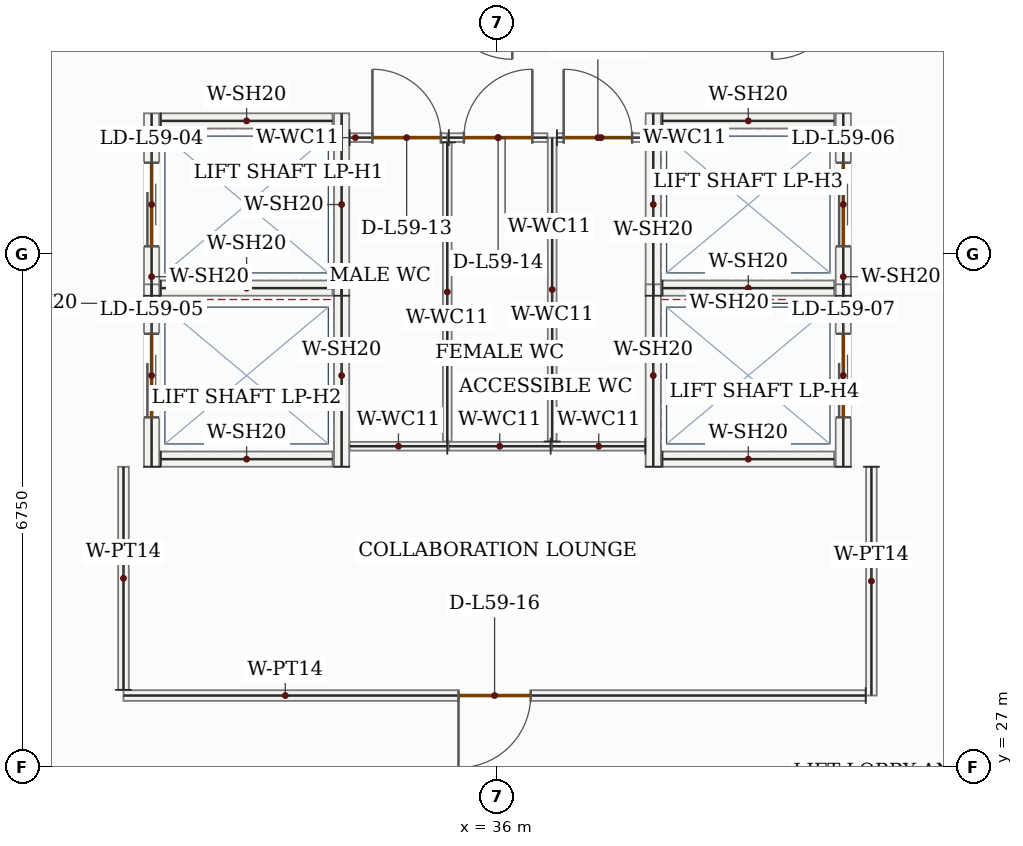
"""IFC4 building model, lengths in metres.
Left out: names, types, materials, properties, quantities, classifications, styles, units other than length and angle.
Written with IfcOpenShell. Run it as: python <this file> out.ifc"""

import sys

from ifc_helpers import new_model, si_unit, direction, frame, frame_2d, origin, place, context, subcontext, project, spatial, rectangle, extrude, source, transform, mapped, element, fill, save


model = new_model("IFC4")
c1 = context("Model", 3, precision=1e-05, world=origin(), true_north=direction((0.0, 1.0)))
c2 = subcontext(c1, "Body", "Model", "MODEL_VIEW")
j1 = project(units=[si_unit("LENGTHUNIT", "METRE"), si_unit("PLANEANGLEUNIT", "RADIAN")], contexts=[c1])
p1 = place(None, origin())
s1 = spatial("IfcSite", under=j1, at=p1, CompositionType="ELEMENT")
p2 = place(p1, origin())
s2 = spatial("IfcBuilding", under=s1, at=p2, CompositionType="ELEMENT")
p3 = place(p2, frame((0.0, 0.0, 250.35)))
s3 = spatial("IfcBuildingStorey", under=s2, at=p3, CompositionType="ELEMENT", Elevation=250.35)
p4 = place(p3, frame((31.45, 33.2, 0.0), z_axis=(0.0, 0.0, 1.0), x_axis=(0.0, 1.0, 0.0)))
e1 = element("IfcWall", 1, at=p4, inside=s3, PredefinedType="SOLIDWALL", context=c2, shape_type="SweptSolid", body=[
    extrude(rectangle(XDim=2.4, YDim=0.2, at=frame_2d((1.2, 0.0))), origin(), (0.0, 0.0, 1.0), 3.5),
])
p5 = place(p4, frame((0.65, 0.0, 0.0)))
e2 = element("IfcOpeningElement", 2, at=p5, cuts=e1, PredefinedType="OPENING", context=c2, shape_type="SweptSolid", body=[
    extrude(rectangle(XDim=1.1, YDim=2.15, at=frame_2d((0.55, 1.075))), frame((0.0, 0.11, 0.0), z_axis=(0.0, -1.0, 0.0), x_axis=(1.0, 0.0, 0.0)), (0.0, 0.0, 1.0), 0.22),
])
m1 = source(origin(), c2, "Body", "SweptSolid", [
    extrude(rectangle(XDim=2.4, YDim=0.2, at=frame_2d((1.2, 0.0))), origin(), (0.0, 0.0, 1.0), 3.5),
])
p6 = place(p3, frame((33.95, 33.2, 0.0), z_axis=(0.0, 0.0, 1.0), x_axis=(0.0, 1.0, 0.0)))
e3 = element("IfcWall", 3, at=p6, inside=s3, PredefinedType="SOLIDWALL", context=c2, shape_type="MappedRepresentation", body=[
    mapped(m1, transform((0.0, 0.0, 0.0), x_axis=(1.0, 0.0, 0.0), y_axis=(0.0, 1.0, 0.0), z_axis=(0.0, 0.0, 1.0), scale=1.0)),
])
m2 = source(origin(), c2, "Body", "SweptSolid", [
    extrude(rectangle(XDim=2.26, YDim=0.2, at=frame_2d((1.13, 0.0))), origin(), (0.0, 0.0, 1.0), 3.5),
])
for number, where, z_axis, x_axis in (
    (4, (31.57, 33.3, 0.0), (0.0, 0.0, 1.0), (1.0, 0.0, 0.0)),
    (5, (31.57, 35.5, 0.0), (0.0, 0.0, 1.0), (1.0, 0.0, 0.0)),
):
    element("IfcWall", number, at=place(p3, frame(where, z_axis=z_axis, x_axis=x_axis)), inside=s3, PredefinedType="SOLIDWALL", context=c2, shape_type="MappedRepresentation", body=[
        mapped(m2, transform((0.0, 0.0, 0.0), x_axis=(1.0, 0.0, 0.0), y_axis=(0.0, 1.0, 0.0), z_axis=(0.0, 0.0, 1.0), scale=1.0)),
    ])
p7 = place(p3, frame((31.45, 30.95, 0.0), z_axis=(0.0, 0.0, 1.0), x_axis=(0.0, 1.0, 0.0)))
e6 = element("IfcWall", 6, at=p7, inside=s3, PredefinedType="SOLIDWALL", context=c2, shape_type="SweptSolid", body=[
    extrude(rectangle(XDim=2.4, YDim=0.2, at=frame_2d((1.2, 0.0))), origin(), (0.0, 0.0, 1.0), 3.5),
])
p8 = place(p7, frame((0.65, 0.0, 0.0)))
e7 = element("IfcOpeningElement", 7, at=p8, cuts=e6, PredefinedType="OPENING", context=c2, shape_type="SweptSolid", body=[
    extrude(rectangle(XDim=1.1, YDim=2.15, at=frame_2d((0.55, 1.075))), frame((0.0, 0.11, 0.0), z_axis=(0.0, -1.0, 0.0), x_axis=(1.0, 0.0, 0.0)), (0.0, 0.0, 1.0), 0.22),
])
p9 = place(p3, frame((33.95, 30.95, 0.0), z_axis=(0.0, 0.0, 1.0), x_axis=(0.0, 1.0, 0.0)))
e8 = element("IfcWall", 8, at=p9, inside=s3, PredefinedType="SOLIDWALL", context=c2, shape_type="MappedRepresentation", body=[
    mapped(m1, transform((0.0, 0.0, 0.0), x_axis=(1.0, 0.0, 0.0), y_axis=(0.0, 1.0, 0.0), z_axis=(0.0, 0.0, 1.0), scale=1.0)),
])
p10 = place(p3, frame((31.57, 31.05, 0.0), z_axis=(0.0, 0.0, 1.0), x_axis=(1.0, 0.0, 0.0)))
e9 = element("IfcWall", 9, at=p10, inside=s3, PredefinedType="SOLIDWALL", context=c2, shape_type="MappedRepresentation", body=[
    mapped(m2, transform((0.0, 0.0, 0.0), x_axis=(1.0, 0.0, 0.0), y_axis=(0.0, 1.0, 0.0), z_axis=(0.0, 0.0, 1.0), scale=1.0)),
])
p11 = place(p3, frame((38.05, 33.2, 0.0), z_axis=(0.0, 0.0, 1.0), x_axis=(0.0, 1.0, 0.0)))
e10 = element("IfcWall", 10, at=p11, inside=s3, PredefinedType="SOLIDWALL", context=c2, shape_type="MappedRepresentation", body=[
    mapped(m1, transform((0.0, 0.0, 0.0), x_axis=(1.0, 0.0, 0.0), y_axis=(0.0, 1.0, 0.0), z_axis=(0.0, 0.0, 1.0), scale=1.0)),
])
p12 = place(p3, frame((40.55, 33.2, 0.0), z_axis=(0.0, 0.0, 1.0), x_axis=(0.0, 1.0, 0.0)))
e11 = element("IfcWall", 11, at=p12, inside=s3, PredefinedType="SOLIDWALL", context=c2, shape_type="SweptSolid", body=[
    extrude(rectangle(XDim=2.4, YDim=0.2, at=frame_2d((1.2, 0.0))), origin(), (0.0, 0.0, 1.0), 3.5),
])
p13 = place(p12, frame((0.65, 0.0, 0.0)))
e12 = element("IfcOpeningElement", 12, at=p13, cuts=e11, PredefinedType="OPENING", context=c2, shape_type="SweptSolid", body=[
    extrude(rectangle(XDim=1.1, YDim=2.15, at=frame_2d((0.55, 1.075))), frame((0.0, 0.11, 0.0), z_axis=(0.0, -1.0, 0.0), x_axis=(1.0, 0.0, 0.0)), (0.0, 0.0, 1.0), 0.22),
])
for number, where, z_axis, x_axis in (
    (13, (38.17, 33.3, 0.0), (0.0, 0.0, 1.0), (1.0, 0.0, 0.0)),
    (14, (38.17, 35.5, 0.0), (0.0, 0.0, 1.0), (1.0, 0.0, 0.0)),
):
    element("IfcWall", number, at=place(p3, frame(where, z_axis=z_axis, x_axis=x_axis)), inside=s3, PredefinedType="SOLIDWALL", context=c2, shape_type="MappedRepresentation", body=[
        mapped(m2, transform((0.0, 0.0, 0.0), x_axis=(1.0, 0.0, 0.0), y_axis=(0.0, 1.0, 0.0), z_axis=(0.0, 0.0, 1.0), scale=1.0)),
    ])
p14 = place(p3, frame((38.05, 30.95, 0.0), z_axis=(0.0, 0.0, 1.0), x_axis=(0.0, 1.0, 0.0)))
e15 = element("IfcWall", 15, at=p14, inside=s3, PredefinedType="SOLIDWALL", context=c2, shape_type="MappedRepresentation", body=[
    mapped(m1, transform((0.0, 0.0, 0.0), x_axis=(1.0, 0.0, 0.0), y_axis=(0.0, 1.0, 0.0), z_axis=(0.0, 0.0, 1.0), scale=1.0)),
])
p15 = place(p3, frame((40.55, 30.95, 0.0), z_axis=(0.0, 0.0, 1.0), x_axis=(0.0, 1.0, 0.0)))
e16 = element("IfcWall", 16, at=p15, inside=s3, PredefinedType="SOLIDWALL", context=c2, shape_type="SweptSolid", body=[
    extrude(rectangle(XDim=2.4, YDim=0.2, at=frame_2d((1.2, 0.0))), origin(), (0.0, 0.0, 1.0), 3.5),
])
p16 = place(p15, frame((0.65, 0.0, 0.0)))
e17 = element("IfcOpeningElement", 17, at=p16, cuts=e16, PredefinedType="OPENING", context=c2, shape_type="SweptSolid", body=[
    extrude(rectangle(XDim=1.1, YDim=2.15, at=frame_2d((0.55, 1.075))), frame((0.0, 0.11, 0.0), z_axis=(0.0, -1.0, 0.0), x_axis=(1.0, 0.0, 0.0)), (0.0, 0.0, 1.0), 0.22),
])
p17 = place(p3, frame((38.17, 31.05, 0.0), z_axis=(0.0, 0.0, 1.0), x_axis=(1.0, 0.0, 0.0)))
e18 = element("IfcWall", 18, at=p17, inside=s3, PredefinedType="SOLIDWALL", context=c2, shape_type="MappedRepresentation", body=[
    mapped(m2, transform((0.0, 0.0, 0.0), x_axis=(1.0, 0.0, 0.0), y_axis=(0.0, 1.0, 0.0), z_axis=(0.0, 0.0, 1.0), scale=1.0)),
])
m3 = source(origin(), c2, "Body", "SweptSolid", [
    extrude(rectangle(XDim=1.225, YDim=0.115, at=frame_2d((0.613, 0.0))), origin(), (0.0, 0.0, 1.0), 3.5),
])
p18 = place(p3, frame((37.945, 31.22, 0.0), z_axis=(0.0, 0.0, 1.0), x_axis=(-1.0, 0.0, 0.0)))
e19 = element("IfcWall", 19, at=p18, inside=s3, PredefinedType="PARTITIONING", context=c2, shape_type="MappedRepresentation", body=[
    mapped(m3, transform((0.0, 0.0, 0.0), x_axis=(1.0, 0.0, 0.0), y_axis=(0.0, 1.0, 0.0), z_axis=(0.0, 0.0, 1.0), scale=1.0)),
])
m4 = source(origin(), c2, "Body", "SweptSolid", [
    extrude(rectangle(XDim=3.998, YDim=0.115, at=frame_2d((1.999, 0.0))), origin(), (0.0, 0.0, 1.0), 3.5),
])
p19 = place(p3, frame((36.72, 31.282, 0.0), z_axis=(0.0, 0.0, 1.0), x_axis=(0.0, 1.0, 0.0)))
e20 = element("IfcWall", 20, at=p19, inside=s3, PredefinedType="PARTITIONING", context=c2, shape_type="MappedRepresentation", body=[
    mapped(m4, transform((0.0, 0.0, 0.0), x_axis=(1.0, 0.0, 0.0), y_axis=(0.0, 1.0, 0.0), z_axis=(0.0, 0.0, 1.0), scale=1.0)),
])
p20 = place(p3, frame((36.782, 35.28, 0.0), z_axis=(0.0, 0.0, 1.0), x_axis=(1.0, 0.0, 0.0)))
e21 = element("IfcWall", 21, at=p20, inside=s3, PredefinedType="PARTITIONING", context=c2, shape_type="SweptSolid", body=[
    extrude(rectangle(XDim=1.163, YDim=0.115, at=frame_2d((0.581, 0.0))), origin(), (0.0, 0.0, 1.0), 3.5),
])
p21 = place(p20, frame((0.089, 0.0, 0.0)))
e22 = element("IfcOpeningElement", 22, at=p21, cuts=e21, PredefinedType="OPENING", context=c2, shape_type="SweptSolid", body=[
    extrude(rectangle(XDim=0.9, YDim=2.1, at=frame_2d((0.45, 1.05))), frame((0.0, 0.067, 0.0), z_axis=(0.0, -1.0, 0.0), x_axis=(1.0, 0.0, 0.0)), (0.0, 0.0, 1.0), 0.135),
])
m5 = source(origin(), c2, "Body", "SweptSolid", [
    extrude(rectangle(XDim=1.285, YDim=0.115, at=frame_2d((0.643, 0.0))), origin(), (0.0, 0.0, 1.0), 3.5),
])
p22 = place(p3, frame((35.34, 31.22, 0.0), z_axis=(0.0, 0.0, 1.0), x_axis=(-1.0, 0.0, 0.0)))
e23 = element("IfcWall", 23, at=p22, inside=s3, PredefinedType="PARTITIONING", context=c2, shape_type="MappedRepresentation", body=[
    mapped(m5, transform((0.0, 0.0, 0.0), x_axis=(1.0, 0.0, 0.0), y_axis=(0.0, 1.0, 0.0), z_axis=(0.0, 0.0, 1.0), scale=1.0)),
])
p23 = place(p3, frame((34.055, 35.28, 0.0), z_axis=(0.0, 0.0, 1.0), x_axis=(1.0, 0.0, 0.0)))
e24 = element("IfcWall", 24, at=p23, inside=s3, PredefinedType="PARTITIONING", context=c2, shape_type="SweptSolid", body=[
    extrude(rectangle(XDim=1.285, YDim=0.115, at=frame_2d((0.643, 0.0))), origin(), (0.0, 0.0, 1.0), 3.5),
])
p24 = place(p23, frame((0.3, 0.0, 0.0)))
e25 = element("IfcOpeningElement", 25, at=p24, cuts=e24, PredefinedType="OPENING", context=c2, shape_type="SweptSolid", body=[
    extrude(rectangle(XDim=0.9, YDim=2.1, at=frame_2d((0.45, 1.05))), frame((0.0, 0.067, 0.0), z_axis=(0.0, -1.0, 0.0), x_axis=(1.0, 0.0, 0.0)), (0.0, 0.0, 1.0), 0.135),
])
m6 = source(origin(), c2, "Body", "SweptSolid", [
    extrude(rectangle(XDim=3.935, YDim=0.115, at=frame_2d((1.968, 0.0))), origin(), (0.0, 0.0, 1.0), 3.5),
])
p25 = place(p3, frame((35.34, 35.218, 0.0), z_axis=(0.0, 0.0, 1.0), x_axis=(0.0, -1.0, 0.0)))
e26 = element("IfcWall", 26, at=p25, inside=s3, PredefinedType="PARTITIONING", context=c2, shape_type="MappedRepresentation", body=[
    mapped(m6, transform((0.0, 0.0, 0.0), x_axis=(1.0, 0.0, 0.0), y_axis=(0.0, 1.0, 0.0), z_axis=(0.0, 0.0, 1.0), scale=1.0)),
])
m7 = source(origin(), c2, "Body", "SweptSolid", [
    extrude(rectangle(XDim=1.34, YDim=0.115, at=frame_2d((0.67, 0.0))), origin(), (0.0, 0.0, 1.0), 3.5),
])
p26 = place(p3, frame((36.7, 31.22, 0.0), z_axis=(0.0, 0.0, 1.0), x_axis=(-1.0, 0.0, 0.0)))
e27 = element("IfcWall", 27, at=p26, inside=s3, PredefinedType="PARTITIONING", context=c2, shape_type="MappedRepresentation", body=[
    mapped(m7, transform((0.0, 0.0, 0.0), x_axis=(1.0, 0.0, 0.0), y_axis=(0.0, 1.0, 0.0), z_axis=(0.0, 0.0, 1.0), scale=1.0)),
])
p27 = place(p3, frame((35.36, 35.28, 0.0), z_axis=(0.0, 0.0, 1.0), x_axis=(1.0, 0.0, 0.0)))
e28 = element("IfcWall", 28, at=p27, inside=s3, PredefinedType="PARTITIONING", context=c2, shape_type="SweptSolid", body=[
    extrude(rectangle(XDim=1.297, YDim=0.115, at=frame_2d((0.649, 0.0))), origin(), (0.0, 0.0, 1.0), 3.5),
])
p28 = place(p27, frame((0.199, 0.0, 0.0)))
e29 = element("IfcOpeningElement", 29, at=p28, cuts=e28, PredefinedType="OPENING", context=c2, shape_type="SweptSolid", body=[
    extrude(rectangle(XDim=0.9, YDim=2.1, at=frame_2d((0.45, 1.05))), frame((0.0, 0.067, 0.0), z_axis=(0.0, -1.0, 0.0), x_axis=(1.0, 0.0, 0.0)), (0.0, 0.0, 1.0), 0.135),
])
m8 = source(origin(), c2, "Body", "SweptSolid", [
    extrude(rectangle(XDim=3.01, YDim=0.14, at=frame_2d((1.505, 0.0))), origin(), (0.0, 0.0, 1.0), 3.5),
])
p29 = place(p3, frame((40.92, 30.95, 0.0), z_axis=(0.0, 0.0, 1.0), x_axis=(0.0, -1.0, 0.0)))
e30 = element("IfcWall", 30, at=p29, inside=s3, PredefinedType="PARTITIONING", context=c2, shape_type="MappedRepresentation", body=[
    mapped(m8, transform((0.0, 0.0, 0.0), x_axis=(1.0, 0.0, 0.0), y_axis=(0.0, 1.0, 0.0), z_axis=(0.0, 0.0, 1.0), scale=1.0)),
])
p30 = place(p3, frame((40.845, 27.94, 0.0), z_axis=(0.0, 0.0, 1.0), x_axis=(-1.0, 0.0, 0.0)))
e31 = element("IfcWall", 31, at=p30, inside=s3, PredefinedType="PARTITIONING", context=c2, shape_type="SweptSolid", body=[
    extrude(rectangle(XDim=9.765, YDim=0.14, at=frame_2d((4.882, 0.0))), origin(), (0.0, 0.0, 1.0), 3.5),
])
p31 = place(p30, frame((4.407, 0.0, 0.0)))
e32 = element("IfcOpeningElement", 32, at=p31, cuts=e31, PredefinedType="OPENING", context=c2, shape_type="SweptSolid", body=[
    extrude(rectangle(XDim=0.95, YDim=2.15, at=frame_2d((0.475, 1.075))), frame((0.0, 0.08, 0.0), z_axis=(0.0, -1.0, 0.0), x_axis=(1.0, 0.0, 0.0)), (0.0, 0.0, 1.0), 0.16),
])
m9 = source(origin(), c2, "Body", "SweptSolid", [
    extrude(rectangle(XDim=2.935, YDim=0.14, at=frame_2d((1.468, 0.0))), origin(), (0.0, 0.0, 1.0), 3.5),
])
p32 = place(p3, frame((31.08, 28.015, 0.0), z_axis=(0.0, 0.0, 1.0), x_axis=(0.0, 1.0, 0.0)))
e33 = element("IfcWall", 33, at=p32, inside=s3, PredefinedType="PARTITIONING", context=c2, shape_type="MappedRepresentation", body=[
    mapped(m9, transform((0.0, 0.0, 0.0), x_axis=(1.0, 0.0, 0.0), y_axis=(0.0, 1.0, 0.0), z_axis=(0.0, 0.0, 1.0), scale=1.0)),
])
m10 = source(origin(), c2, "Body", "SweptSolid", [
    extrude(rectangle(XDim=1.1, YDim=2.15, at=frame_2d((0.55, 1.075))), frame((0.0, 0.025, 0.0), z_axis=(0.0, -1.0, 0.0), x_axis=(1.0, 0.0, 0.0)), (0.0, 0.0, 1.0), 0.05),
])
p33 = place(p5, origin())
e34 = element("IfcDoor", 34, at=p33, inside=s3, OperationType="DOUBLE_DOOR_SLIDING", PredefinedType="DOOR", context=c2, shape_type="MappedRepresentation", body=[
    mapped(m10, transform((0.0, 0.0, 0.0), x_axis=(1.0, 0.0, 0.0), y_axis=(0.0, 1.0, 0.0), z_axis=(0.0, 0.0, 1.0), scale=1.0)),
])
fill(e2, e34)
p34 = place(p8, origin())
e35 = element("IfcDoor", 35, at=p34, inside=s3, OperationType="DOUBLE_DOOR_SLIDING", PredefinedType="DOOR", context=c2, shape_type="MappedRepresentation", body=[
    mapped(m10, transform((0.0, 0.0, 0.0), x_axis=(1.0, 0.0, 0.0), y_axis=(0.0, 1.0, 0.0), z_axis=(0.0, 0.0, 1.0), scale=1.0)),
])
fill(e7, e35)
p35 = place(p13, origin())
e36 = element("IfcDoor", 36, at=p35, inside=s3, OperationType="DOUBLE_DOOR_SLIDING", PredefinedType="DOOR", context=c2, shape_type="MappedRepresentation", body=[
    mapped(m10, transform((0.0, 0.0, 0.0), x_axis=(1.0, 0.0, 0.0), y_axis=(0.0, 1.0, 0.0), z_axis=(0.0, 0.0, 1.0), scale=1.0)),
])
fill(e12, e36)
p36 = place(p16, origin())
e37 = element("IfcDoor", 37, at=p36, inside=s3, OperationType="DOUBLE_DOOR_SLIDING", PredefinedType="DOOR", context=c2, shape_type="MappedRepresentation", body=[
    mapped(m10, transform((0.0, 0.0, 0.0), x_axis=(1.0, 0.0, 0.0), y_axis=(0.0, 1.0, 0.0), z_axis=(0.0, 0.0, 1.0), scale=1.0)),
])
fill(e17, e37)
m11 = source(origin(), c2, "Body", "SweptSolid", [
    extrude(rectangle(XDim=0.9, YDim=2.1, at=frame_2d((0.45, 1.05))), frame((0.0, 0.025, 0.0), z_axis=(0.0, -1.0, 0.0), x_axis=(1.0, 0.0, 0.0)), (0.0, 0.0, 1.0), 0.05),
])
p37 = place(p24, origin())
e38 = element("IfcDoor", 38, at=p37, inside=s3, OperationType="SINGLE_SWING_LEFT", PredefinedType="DOOR", context=c2, shape_type="MappedRepresentation", body=[
    mapped(m11, transform((0.0, 0.0, 0.0), x_axis=(1.0, 0.0, 0.0), y_axis=(0.0, 1.0, 0.0), z_axis=(0.0, 0.0, 1.0), scale=1.0)),
])
fill(e25, e38)
p38 = place(p28, origin())
e39 = element("IfcDoor", 39, at=p38, inside=s3, OperationType="SINGLE_SWING_RIGHT", PredefinedType="DOOR", context=c2, shape_type="MappedRepresentation", body=[
    mapped(m11, transform((0.0, 0.0, 0.0), x_axis=(1.0, 0.0, 0.0), y_axis=(0.0, 1.0, 0.0), z_axis=(0.0, 0.0, 1.0), scale=1.0)),
])
fill(e29, e39)
p39 = place(p21, origin())
e40 = element("IfcDoor", 40, at=p39, inside=s3, OperationType="SINGLE_SWING_LEFT", PredefinedType="DOOR", context=c2, shape_type="MappedRepresentation", body=[
    mapped(m11, transform((0.0, 0.0, 0.0), x_axis=(1.0, 0.0, 0.0), y_axis=(0.0, 1.0, 0.0), z_axis=(0.0, 0.0, 1.0), scale=1.0)),
])
fill(e22, e40)
m12 = source(origin(), c2, "Body", "SweptSolid", [
    extrude(rectangle(XDim=0.95, YDim=2.15, at=frame_2d((0.475, 1.075))), frame((0.0, 0.025, 0.0), z_axis=(0.0, -1.0, 0.0), x_axis=(1.0, 0.0, 0.0)), (0.0, 0.0, 1.0), 0.05),
])
p40 = place(p31, origin())
e41 = element("IfcDoor", 41, at=p40, inside=s3, OperationType="SINGLE_SWING_RIGHT", PredefinedType="DOOR", context=c2, shape_type="MappedRepresentation", body=[
    mapped(m12, transform((0.0, 0.0, 0.0), x_axis=(1.0, 0.0, 0.0), y_axis=(0.0, 1.0, 0.0), z_axis=(0.0, 0.0, 1.0), scale=1.0)),
])
fill(e32, e41)
save(model, sys.argv[1])
